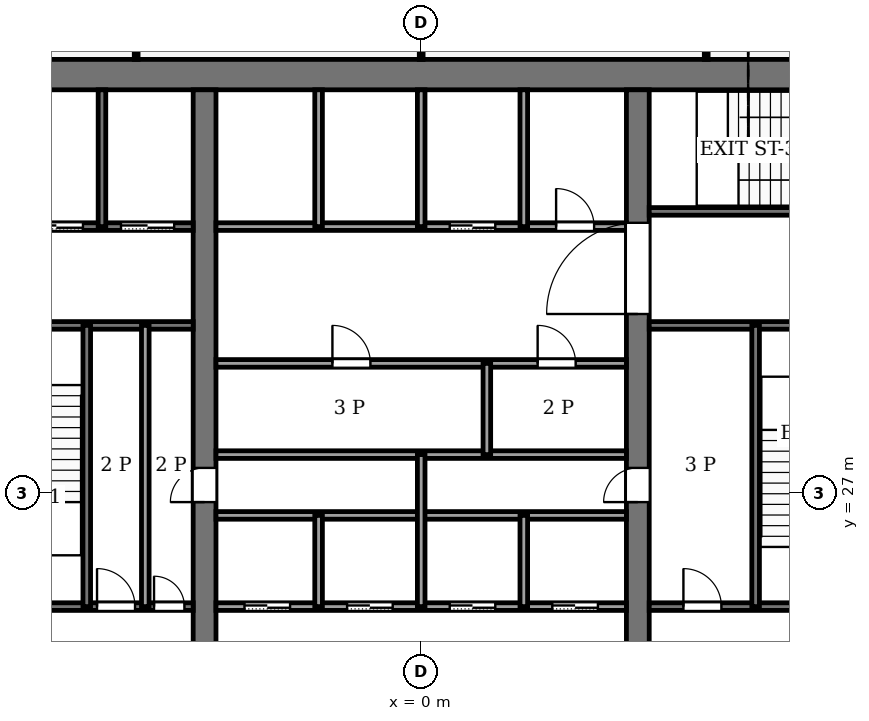
"""IFC4 building model, lengths in metres.
Left out: names, types, materials, properties, quantities, classifications, styles, units other than length and angle.
Written with IfcOpenShell. Run it as: python <this file> out.ifc"""

import sys

from ifc_helpers import new_model, si_unit, direction, frame, frame_2d, origin, place, context, subcontext, project, spatial, rectangle, extrude, element, fill, save


model = new_model("IFC4")
c1 = context("Model", 3, precision=1e-05, world=origin(), true_north=direction((0.0, 1.0)))
c2 = subcontext(c1, "Body", "Model", "MODEL_VIEW")
j1 = project(units=[si_unit("LENGTHUNIT", "METRE"), si_unit("PLANEANGLEUNIT", "RADIAN")], contexts=[c1])
p1 = place(None, origin())
s1 = spatial("IfcSite", under=j1, at=p1, CompositionType="ELEMENT")
p2 = place(p1, origin())
s2 = spatial("IfcBuilding", under=s1, at=p2, CompositionType="ELEMENT")
p3 = place(p2, frame((0.0, 0.0, 258.0)))
s3 = spatial("IfcBuildingStorey", under=s2, at=p3, CompositionType="ELEMENT", Elevation=258.0)
p4 = place(p3, frame((-13.4, 38.0, -0.13), z_axis=(0.0, 0.0, 1.0), x_axis=(1.0, 0.0, 0.0)))
e1 = element("IfcWall", 1, at=p4, inside=s3, PredefinedType="SHEAR", context=c2, shape_type="SweptSolid", body=[
    extrude(rectangle(XDim=26.8, YDim=0.8, at=frame_2d((13.4, 0.0))), origin(), (0.0, 0.0, 1.0), 4.0),
])
p5 = place(p3, frame((-5.7, 18.4, -0.13), z_axis=(0.0, 0.0, 1.0), x_axis=(0.0, 1.0, 0.0)))
e2 = element("IfcWall", 2, at=p5, inside=s3, PredefinedType="SHEAR", context=c2, shape_type="SweptSolid", body=[
    extrude(rectangle(XDim=19.2, YDim=0.6, at=frame_2d((9.6, 0.0))), origin(), (0.0, 0.0, 1.0), 4.0),
])
p6 = place(p5, frame((8.35, 0.0, 0.13)))
e3 = element("IfcOpeningElement", 3, at=p6, cuts=e2, PredefinedType="OPENING", context=c2, shape_type="SweptSolid", body=[
    extrude(rectangle(XDim=0.9, YDim=2.1, at=frame_2d((0.45, 1.05))), frame((0.0, 0.31, 0.0), z_axis=(0.0, -1.0, 0.0), x_axis=(1.0, 0.0, 0.0)), (0.0, 0.0, 1.0), 0.62),
])
p7 = place(p3, frame((5.7, 18.4, -0.13), z_axis=(0.0, 0.0, 1.0), x_axis=(0.0, 1.0, 0.0)))
e4 = element("IfcWall", 4, at=p7, inside=s3, PredefinedType="SHEAR", context=c2, shape_type="SweptSolid", body=[
    extrude(rectangle(XDim=19.2, YDim=0.6, at=frame_2d((9.6, 0.0))), origin(), (0.0, 0.0, 1.0), 4.0),
])
p8 = place(p7, frame((8.35, 0.0, 0.13)))
e5 = element("IfcOpeningElement", 5, at=p8, cuts=e4, PredefinedType="OPENING", context=c2, shape_type="SweptSolid", body=[
    extrude(rectangle(XDim=0.9, YDim=2.1, at=frame_2d((0.45, 1.05))), frame((0.0, 0.31, 0.0), z_axis=(0.0, -1.0, 0.0), x_axis=(1.0, 0.0, 0.0)), (0.0, 0.0, 1.0), 0.62),
])
p9 = place(p7, frame((13.3, 0.0, 0.13)))
e6 = element("IfcOpeningElement", 6, at=p9, cuts=e4, PredefinedType="OPENING", context=c2, shape_type="SweptSolid", body=[
    extrude(rectangle(XDim=2.4, YDim=2.4, at=frame_2d((1.2, 1.2))), frame((0.0, 0.31, 0.0), z_axis=(0.0, -1.0, 0.0), x_axis=(1.0, 0.0, 0.0)), (0.0, 0.0, 1.0), 0.62),
])
p10 = place(p3, frame((-12.6, 24.0, 0.0), z_axis=(0.0, 0.0, 1.0), x_axis=(1.0, 0.0, 0.0)))
e7 = element("IfcWall", 7, at=p10, inside=s3, PredefinedType="PARTITIONING", context=c2, shape_type="SweptSolid", body=[
    extrude(rectangle(XDim=6.6, YDim=0.2, at=frame_2d((3.3, 0.0))), origin(), (0.0, 0.0, 1.0), 3.87),
])
p11 = place(p10, frame((4.07, 0.0, 0.0)))
e8 = element("IfcOpeningElement", 8, at=p11, cuts=e7, PredefinedType="OPENING", context=c2, shape_type="SweptSolid", body=[
    extrude(rectangle(XDim=1.0, YDim=2.1, at=frame_2d((0.5, 1.05))), frame((0.0, 0.11, 0.0), z_axis=(0.0, -1.0, 0.0), x_axis=(1.0, 0.0, 0.0)), (0.0, 0.0, 1.0), 0.22),
])
p12 = place(p10, frame((5.57, 0.0, 0.0)))
e9 = element("IfcOpeningElement", 9, at=p12, cuts=e7, PredefinedType="OPENING", context=c2, shape_type="SweptSolid", body=[
    extrude(rectangle(XDim=0.8, YDim=2.1, at=frame_2d((0.4, 1.05))), frame((0.0, 0.11, 0.0), z_axis=(0.0, -1.0, 0.0), x_axis=(1.0, 0.0, 0.0)), (0.0, 0.0, 1.0), 0.22),
])
p13 = place(p3, frame((-5.4, 24.0, 0.0), z_axis=(0.0, 0.0, 1.0), x_axis=(1.0, 0.0, 0.0)))
e10 = element("IfcWall", 10, at=p13, inside=s3, PredefinedType="PARTITIONING", context=c2, shape_type="SweptSolid", body=[
    extrude(rectangle(XDim=10.8, YDim=0.2, at=frame_2d((5.4, 0.0))), origin(), (0.0, 0.0, 1.0), 3.87),
])
p14 = place(p13, frame((0.75, 0.0, 0.0)))
e11 = element("IfcOpeningElement", 11, at=p14, cuts=e10, PredefinedType="OPENING", context=c2, shape_type="SweptSolid", body=[
    extrude(rectangle(XDim=1.2, YDim=2.2, at=frame_2d((0.6, 1.1))), frame((0.0, 0.11, 0.0), z_axis=(0.0, -1.0, 0.0), x_axis=(1.0, 0.0, 0.0)), (0.0, 0.0, 1.0), 0.22),
])
p15 = place(p13, frame((3.45, 0.0, 0.0)))
e12 = element("IfcOpeningElement", 12, at=p15, cuts=e10, PredefinedType="OPENING", context=c2, shape_type="SweptSolid", body=[
    extrude(rectangle(XDim=1.2, YDim=2.2, at=frame_2d((0.6, 1.1))), frame((0.0, 0.11, 0.0), z_axis=(0.0, -1.0, 0.0), x_axis=(1.0, 0.0, 0.0)), (0.0, 0.0, 1.0), 0.22),
])
p16 = place(p13, frame((6.15, 0.0, 0.0)))
e13 = element("IfcOpeningElement", 13, at=p16, cuts=e10, PredefinedType="OPENING", context=c2, shape_type="SweptSolid", body=[
    extrude(rectangle(XDim=1.2, YDim=2.2, at=frame_2d((0.6, 1.1))), frame((0.0, 0.11, 0.0), z_axis=(0.0, -1.0, 0.0), x_axis=(1.0, 0.0, 0.0)), (0.0, 0.0, 1.0), 0.22),
])
p17 = place(p13, frame((8.85, 0.0, 0.0)))
e14 = element("IfcOpeningElement", 14, at=p17, cuts=e10, PredefinedType="OPENING", context=c2, shape_type="SweptSolid", body=[
    extrude(rectangle(XDim=1.2, YDim=2.2, at=frame_2d((0.6, 1.1))), frame((0.0, 0.11, 0.0), z_axis=(0.0, -1.0, 0.0), x_axis=(1.0, 0.0, 0.0)), (0.0, 0.0, 1.0), 0.22),
])
p18 = place(p3, frame((6.0, 24.0, 0.0), z_axis=(0.0, 0.0, 1.0), x_axis=(1.0, 0.0, 0.0)))
e15 = element("IfcWall", 15, at=p18, inside=s3, PredefinedType="PARTITIONING", context=c2, shape_type="SweptSolid", body=[
    extrude(rectangle(XDim=6.6, YDim=0.2, at=frame_2d((3.3, 0.0))), origin(), (0.0, 0.0, 1.0), 3.87),
])
p19 = place(p18, frame((0.9, 0.0, 0.0)))
e16 = element("IfcOpeningElement", 16, at=p19, cuts=e15, PredefinedType="OPENING", context=c2, shape_type="SweptSolid", body=[
    extrude(rectangle(XDim=1.0, YDim=2.1, at=frame_2d((0.5, 1.05))), frame((0.0, 0.11, 0.0), z_axis=(0.0, -1.0, 0.0), x_axis=(1.0, 0.0, 0.0)), (0.0, 0.0, 1.0), 0.22),
])
p20 = place(p18, frame((4.4, 0.0, 0.0)))
e17 = element("IfcOpeningElement", 17, at=p20, cuts=e15, PredefinedType="OPENING", context=c2, shape_type="SweptSolid", body=[
    extrude(rectangle(XDim=1.2, YDim=2.2, at=frame_2d((0.6, 1.1))), frame((0.0, 0.11, 0.0), z_axis=(0.0, -1.0, 0.0), x_axis=(1.0, 0.0, 0.0)), (0.0, 0.0, 1.0), 0.22),
])
for number, where, z_axis, x_axis in (
    (18, (-5.4, 26.4, 0.0), (0.0, 0.0, 1.0), (1.0, 0.0, 0.0)),
    (19, (-5.4, 28.0, 0.0), (0.0, 0.0, 1.0), (1.0, 0.0, 0.0)),
):
    element("IfcWall", number, at=place(p3, frame(where, z_axis=z_axis, x_axis=x_axis)), inside=s3, PredefinedType="PARTITIONING", context=c2, shape_type="SweptSolid", body=[
        extrude(rectangle(XDim=10.8, YDim=0.2, at=frame_2d((5.4, 0.0))), origin(), (0.0, 0.0, 1.0), 3.87),
    ])
p21 = place(p3, frame((-5.4, 30.4, 0.0), z_axis=(0.0, 0.0, 1.0), x_axis=(1.0, 0.0, 0.0)))
e20 = element("IfcWall", 20, at=p21, inside=s3, PredefinedType="PARTITIONING", context=c2, shape_type="SweptSolid", body=[
    extrude(rectangle(XDim=10.8, YDim=0.2, at=frame_2d((5.4, 0.0))), origin(), (0.0, 0.0, 1.0), 3.87),
])
p22 = place(p21, frame((3.064, 0.0, 0.0)))
e21 = element("IfcOpeningElement", 21, at=p22, cuts=e20, PredefinedType="OPENING", context=c2, shape_type="SweptSolid", body=[
    extrude(rectangle(XDim=1.0, YDim=2.1, at=frame_2d((0.5, 1.05))), frame((0.0, 0.11, 0.0), z_axis=(0.0, -1.0, 0.0), x_axis=(1.0, 0.0, 0.0)), (0.0, 0.0, 1.0), 0.22),
])
p23 = place(p21, frame((8.464, 0.0, 0.0)))
e22 = element("IfcOpeningElement", 22, at=p23, cuts=e20, PredefinedType="OPENING", context=c2, shape_type="SweptSolid", body=[
    extrude(rectangle(XDim=1.0, YDim=2.1, at=frame_2d((0.5, 1.05))), frame((0.0, 0.11, 0.0), z_axis=(0.0, -1.0, 0.0), x_axis=(1.0, 0.0, 0.0)), (0.0, 0.0, 1.0), 0.22),
])
p24 = place(p3, frame((-12.6, 31.4, 0.0), z_axis=(0.0, 0.0, 1.0), x_axis=(1.0, 0.0, 0.0)))
e23 = element("IfcWall", 23, at=p24, inside=s3, PredefinedType="PARTITIONING", context=c2, shape_type="SweptSolid", body=[
    extrude(rectangle(XDim=6.6, YDim=0.2, at=frame_2d((3.3, 0.0))), origin(), (0.0, 0.0, 1.0), 3.87),
])
p25 = place(p24, frame((1.0, 0.0, 0.0)))
e24 = element("IfcOpeningElement", 24, at=p25, cuts=e23, PredefinedType="OPENING", context=c2, shape_type="SweptSolid", body=[
    extrude(rectangle(XDim=1.2, YDim=2.2, at=frame_2d((0.6, 1.1))), frame((0.0, 0.11, 0.0), z_axis=(0.0, -1.0, 0.0), x_axis=(1.0, 0.0, 0.0)), (0.0, 0.0, 1.0), 0.22),
])
p26 = place(p3, frame((6.0, 31.4, 0.0), z_axis=(0.0, 0.0, 1.0), x_axis=(1.0, 0.0, 0.0)))
e25 = element("IfcWall", 25, at=p26, inside=s3, PredefinedType="PARTITIONING", context=c2, shape_type="SweptSolid", body=[
    extrude(rectangle(XDim=6.6, YDim=0.2, at=frame_2d((3.3, 0.0))), origin(), (0.0, 0.0, 1.0), 3.87),
])
p27 = place(p3, frame((-12.6, 34.0, 0.0), z_axis=(0.0, 0.0, 1.0), x_axis=(1.0, 0.0, 0.0)))
e26 = element("IfcWall", 26, at=p27, inside=s3, PredefinedType="PARTITIONING", context=c2, shape_type="SweptSolid", body=[
    extrude(rectangle(XDim=6.6, YDim=0.2, at=frame_2d((3.3, 0.0))), origin(), (0.0, 0.0, 1.0), 3.87),
])
p28 = place(p27, frame((4.7, 0.0, 0.0)))
e27 = element("IfcOpeningElement", 27, at=p28, cuts=e26, PredefinedType="OPENING", context=c2, shape_type="SweptSolid", body=[
    extrude(rectangle(XDim=1.4, YDim=2.2, at=frame_2d((0.7, 1.1))), frame((0.0, 0.11, 0.0), z_axis=(0.0, -1.0, 0.0), x_axis=(1.0, 0.0, 0.0)), (0.0, 0.0, 1.0), 0.22),
])
p29 = place(p27, frame((2.3, 0.0, 0.0)))
e28 = element("IfcOpeningElement", 28, at=p29, cuts=e26, PredefinedType="OPENING", context=c2, shape_type="SweptSolid", body=[
    extrude(rectangle(XDim=1.4, YDim=2.2, at=frame_2d((0.7, 1.1))), frame((0.0, 0.11, 0.0), z_axis=(0.0, -1.0, 0.0), x_axis=(1.0, 0.0, 0.0)), (0.0, 0.0, 1.0), 0.22),
])
p30 = place(p27, frame((0.45, 0.0, 0.0)))
e29 = element("IfcOpeningElement", 29, at=p30, cuts=e26, PredefinedType="OPENING", context=c2, shape_type="SweptSolid", body=[
    extrude(rectangle(XDim=0.9, YDim=2.1, at=frame_2d((0.45, 1.05))), frame((0.0, 0.11, 0.0), z_axis=(0.0, -1.0, 0.0), x_axis=(1.0, 0.0, 0.0)), (0.0, 0.0, 1.0), 0.22),
])
p31 = place(p3, frame((-5.4, 34.0, 0.0), z_axis=(0.0, 0.0, 1.0), x_axis=(1.0, 0.0, 0.0)))
e30 = element("IfcWall", 30, at=p31, inside=s3, PredefinedType="PARTITIONING", context=c2, shape_type="SweptSolid", body=[
    extrude(rectangle(XDim=10.8, YDim=0.2, at=frame_2d((5.4, 0.0))), origin(), (0.0, 0.0, 1.0), 3.87),
])
p32 = place(p31, frame((6.15, 0.0, 0.0)))
e31 = element("IfcOpeningElement", 31, at=p32, cuts=e30, PredefinedType="OPENING", context=c2, shape_type="SweptSolid", body=[
    extrude(rectangle(XDim=1.2, YDim=2.2, at=frame_2d((0.6, 1.1))), frame((0.0, 0.11, 0.0), z_axis=(0.0, -1.0, 0.0), x_axis=(1.0, 0.0, 0.0)), (0.0, 0.0, 1.0), 0.22),
])
p33 = place(p31, frame((8.95, 0.0, 0.0)))
e32 = element("IfcOpeningElement", 32, at=p33, cuts=e30, PredefinedType="OPENING", context=c2, shape_type="SweptSolid", body=[
    extrude(rectangle(XDim=1.0, YDim=2.1, at=frame_2d((0.5, 1.05))), frame((0.0, 0.11, 0.0), z_axis=(0.0, -1.0, 0.0), x_axis=(1.0, 0.0, 0.0)), (0.0, 0.0, 1.0), 0.22),
])
p34 = place(p3, frame((6.0, 34.4, 0.0), z_axis=(0.0, 0.0, 1.0), x_axis=(1.0, 0.0, 0.0)))
e33 = element("IfcWall", 33, at=p34, inside=s3, PredefinedType="PARTITIONING", context=c2, shape_type="SweptSolid", body=[
    extrude(rectangle(XDim=6.6, YDim=0.2, at=frame_2d((3.3, 0.0))), origin(), (0.0, 0.0, 1.0), 3.87),
])
p35 = place(p34, frame((4.8, 0.0, 0.0)))
e34 = element("IfcOpeningElement", 34, at=p35, cuts=e33, PredefinedType="OPENING", context=c2, shape_type="SweptSolid", body=[
    extrude(rectangle(XDim=1.2, YDim=2.2, at=frame_2d((0.6, 1.1))), frame((0.0, 0.11, 0.0), z_axis=(0.0, -1.0, 0.0), x_axis=(1.0, 0.0, 0.0)), (0.0, 0.0, 1.0), 0.22),
])
p36 = place(p3, frame((-8.8, 24.0, 0.0), z_axis=(0.0, 0.0, 1.0), x_axis=(0.0, 1.0, 0.0)))
e35 = element("IfcWall", 35, at=p36, inside=s3, PredefinedType="PARTITIONING", context=c2, shape_type="SweptSolid", body=[
    extrude(rectangle(XDim=7.4, YDim=0.2, at=frame_2d((3.7, 0.0))), origin(), (0.0, 0.0, 1.0), 3.87),
])
p37 = place(p3, frame((-8.4, 34.0, 0.0), z_axis=(0.0, 0.0, 1.0), x_axis=(0.0, 1.0, 0.0)))
e36 = element("IfcWall", 36, at=p37, inside=s3, PredefinedType="PARTITIONING", context=c2, shape_type="SweptSolid", body=[
    extrude(rectangle(XDim=3.6, YDim=0.2, at=frame_2d((1.8, 0.0))), origin(), (0.0, 0.0, 1.0), 3.87),
])
p38 = place(p3, frame((-7.26, 24.0, 0.0), z_axis=(0.0, 0.0, 1.0), x_axis=(0.0, 1.0, 0.0)))
e37 = element("IfcWall", 37, at=p38, inside=s3, PredefinedType="PARTITIONING", context=c2, shape_type="SweptSolid", body=[
    extrude(rectangle(XDim=7.4, YDim=0.2, at=frame_2d((3.7, 0.0))), origin(), (0.0, 0.0, 1.0), 3.87),
])
p39 = place(p3, frame((-2.7, 24.0, 0.0), z_axis=(0.0, 0.0, 1.0), x_axis=(0.0, 1.0, 0.0)))
e38 = element("IfcWall", 38, at=p39, inside=s3, PredefinedType="PARTITIONING", context=c2, shape_type="SweptSolid", body=[
    extrude(rectangle(XDim=2.4, YDim=0.2, at=frame_2d((1.2, 0.0))), origin(), (0.0, 0.0, 1.0), 3.87),
])
p40 = place(p3, frame((-2.7, 34.0, 0.0), z_axis=(0.0, 0.0, 1.0), x_axis=(0.0, 1.0, 0.0)))
e39 = element("IfcWall", 39, at=p40, inside=s3, PredefinedType="PARTITIONING", context=c2, shape_type="SweptSolid", body=[
    extrude(rectangle(XDim=3.6, YDim=0.2, at=frame_2d((1.8, 0.0))), origin(), (0.0, 0.0, 1.0), 3.87),
])
p41 = place(p3, frame((0.0, 24.0, 0.0), z_axis=(0.0, 0.0, 1.0), x_axis=(0.0, 1.0, 0.0)))
e40 = element("IfcWall", 40, at=p41, inside=s3, PredefinedType="PARTITIONING", context=c2, shape_type="SweptSolid", body=[
    extrude(rectangle(XDim=4.0, YDim=0.2, at=frame_2d((2.0, 0.0))), origin(), (0.0, 0.0, 1.0), 3.87),
])
p42 = place(p3, frame((0.0, 34.0, 0.0), z_axis=(0.0, 0.0, 1.0), x_axis=(0.0, 1.0, 0.0)))
e41 = element("IfcWall", 41, at=p42, inside=s3, PredefinedType="PARTITIONING", context=c2, shape_type="SweptSolid", body=[
    extrude(rectangle(XDim=3.6, YDim=0.2, at=frame_2d((1.8, 0.0))), origin(), (0.0, 0.0, 1.0), 3.87),
])
for number, where, z_axis, x_axis in (
    (42, (1.728, 28.0, 0.0), (0.0, 0.0, 1.0), (0.0, 1.0, 0.0)),
    (43, (2.7, 24.0, 0.0), (0.0, 0.0, 1.0), (0.0, 1.0, 0.0)),
):
    element("IfcWall", number, at=place(p3, frame(where, z_axis=z_axis, x_axis=x_axis)), inside=s3, PredefinedType="PARTITIONING", context=c2, shape_type="SweptSolid", body=[
        extrude(rectangle(XDim=2.4, YDim=0.2, at=frame_2d((1.2, 0.0))), origin(), (0.0, 0.0, 1.0), 3.87),
    ])
p43 = place(p3, frame((2.7, 34.0, 0.0), z_axis=(0.0, 0.0, 1.0), x_axis=(0.0, 1.0, 0.0)))
e44 = element("IfcWall", 44, at=p43, inside=s3, PredefinedType="PARTITIONING", context=c2, shape_type="SweptSolid", body=[
    extrude(rectangle(XDim=3.6, YDim=0.2, at=frame_2d((1.8, 0.0))), origin(), (0.0, 0.0, 1.0), 3.87),
])
p44 = place(p3, frame((8.8, 24.0, 0.0), z_axis=(0.0, 0.0, 1.0), x_axis=(0.0, 1.0, 0.0)))
e45 = element("IfcWall", 45, at=p44, inside=s3, PredefinedType="PARTITIONING", context=c2, shape_type="SweptSolid", body=[
    extrude(rectangle(XDim=7.4, YDim=0.2, at=frame_2d((3.7, 0.0))), origin(), (0.0, 0.0, 1.0), 3.87),
])
p45 = place(p3, frame((-7.5, 40.504, 0.0), z_axis=(0.0, 0.0, 1.0), x_axis=(0.0, -1.0, 0.0)))
e46 = element("IfcWall", 46, at=p45, inside=s3, PredefinedType="PARTITIONING", context=c2, shape_type="SweptSolid", body=[
    extrude(rectangle(XDim=2.104, YDim=0.1, at=frame_2d((1.052, 0.0))), origin(), (0.0, 0.0, 1.0), 3.87),
])
p46 = place(p45, frame((0.552, 0.0, 0.0)))
e47 = element("IfcOpeningElement", 47, at=p46, cuts=e46, PredefinedType="OPENING", context=c2, shape_type="SweptSolid", body=[
    extrude(rectangle(XDim=1.0, YDim=2.1, at=frame_2d((0.5, 1.05))), frame((0.0, 0.06, 0.0), z_axis=(0.0, -1.0, 0.0), x_axis=(1.0, 0.0, 0.0)), (0.0, 0.0, 1.0), 0.12),
])
p47 = place(p3, frame((0.0, 38.4, 0.0), z_axis=(0.0, 0.0, 1.0), x_axis=(0.0, 1.0, 0.0)))
e48 = element("IfcWall", 48, at=p47, inside=s3, PredefinedType="PARTITIONING", context=c2, shape_type="SweptSolid", body=[
    extrude(rectangle(XDim=8.104, YDim=0.1, at=frame_2d((4.052, 0.0))), origin(), (0.0, 0.0, 1.0), 3.44),
])
p48 = place(p3, frame((7.5, 43.504, 0.0), z_axis=(0.0, 0.0, 1.0), x_axis=(0.0, -1.0, 0.0)))
e49 = element("IfcWall", 49, at=p48, inside=s3, PredefinedType="PARTITIONING", context=c2, shape_type="SweptSolid", body=[
    extrude(rectangle(XDim=5.104, YDim=0.1, at=frame_2d((2.552, 0.0))), origin(), (0.0, 0.0, 1.0), 3.87),
])
p49 = place(p14, origin())
e50 = element("IfcDoor", 50, at=p49, inside=s3, OperationType="SLIDING_TO_LEFT", PredefinedType="DOOR", context=c2, shape_type="SweptSolid", body=[
    extrude(rectangle(XDim=1.2, YDim=2.2, at=frame_2d((0.6, 1.1))), frame((0.0, 0.025, 0.0), z_axis=(0.0, -1.0, 0.0), x_axis=(1.0, 0.0, 0.0)), (0.0, 0.0, 1.0), 0.05),
])
fill(e11, e50)
p50 = place(p15, origin())
e51 = element("IfcDoor", 51, at=p50, inside=s3, OperationType="SLIDING_TO_LEFT", PredefinedType="DOOR", context=c2, shape_type="SweptSolid", body=[
    extrude(rectangle(XDim=1.2, YDim=2.2, at=frame_2d((0.6, 1.1))), frame((0.0, 0.025, 0.0), z_axis=(0.0, -1.0, 0.0), x_axis=(1.0, 0.0, 0.0)), (0.0, 0.0, 1.0), 0.05),
])
fill(e12, e51)
p51 = place(p16, origin())
e52 = element("IfcDoor", 52, at=p51, inside=s3, OperationType="SLIDING_TO_LEFT", PredefinedType="DOOR", context=c2, shape_type="SweptSolid", body=[
    extrude(rectangle(XDim=1.2, YDim=2.2, at=frame_2d((0.6, 1.1))), frame((0.0, 0.025, 0.0), z_axis=(0.0, -1.0, 0.0), x_axis=(1.0, 0.0, 0.0)), (0.0, 0.0, 1.0), 0.05),
])
fill(e13, e52)
p52 = place(p17, origin())
e53 = element("IfcDoor", 53, at=p52, inside=s3, OperationType="SLIDING_TO_LEFT", PredefinedType="DOOR", context=c2, shape_type="SweptSolid", body=[
    extrude(rectangle(XDim=1.2, YDim=2.2, at=frame_2d((0.6, 1.1))), frame((0.0, 0.025, 0.0), z_axis=(0.0, -1.0, 0.0), x_axis=(1.0, 0.0, 0.0)), (0.0, 0.0, 1.0), 0.05),
])
fill(e14, e53)
p53 = place(p32, origin())
e54 = element("IfcDoor", 54, at=p53, inside=s3, OperationType="SLIDING_TO_LEFT", PredefinedType="DOOR", context=c2, shape_type="SweptSolid", body=[
    extrude(rectangle(XDim=1.2, YDim=2.2, at=frame_2d((0.6, 1.1))), frame((0.0, 0.025, 0.0), z_axis=(0.0, -1.0, 0.0), x_axis=(1.0, 0.0, 0.0)), (0.0, 0.0, 1.0), 0.05),
])
fill(e31, e54)
p54 = place(p28, origin())
e55 = element("IfcDoor", 55, at=p54, inside=s3, OperationType="SLIDING_TO_LEFT", PredefinedType="DOOR", context=c2, shape_type="SweptSolid", body=[
    extrude(rectangle(XDim=1.4, YDim=2.2, at=frame_2d((0.7, 1.1))), frame((0.0, 0.025, 0.0), z_axis=(0.0, -1.0, 0.0), x_axis=(1.0, 0.0, 0.0)), (0.0, 0.0, 1.0), 0.05),
])
fill(e27, e55)
p55 = place(p29, origin())
e56 = element("IfcDoor", 56, at=p55, inside=s3, OperationType="SLIDING_TO_LEFT", PredefinedType="DOOR", context=c2, shape_type="SweptSolid", body=[
    extrude(rectangle(XDim=1.4, YDim=2.2, at=frame_2d((0.7, 1.1))), frame((0.0, 0.025, 0.0), z_axis=(0.0, -1.0, 0.0), x_axis=(1.0, 0.0, 0.0)), (0.0, 0.0, 1.0), 0.05),
])
fill(e28, e56)
p56 = place(p22, origin())
e57 = element("IfcDoor", 57, at=p56, inside=s3, OperationType="SINGLE_SWING_RIGHT", PredefinedType="DOOR", context=c2, shape_type="SweptSolid", body=[
    extrude(rectangle(XDim=1.0, YDim=2.1, at=frame_2d((0.5, 1.05))), frame((0.0, 0.025, 0.0), z_axis=(0.0, -1.0, 0.0), x_axis=(1.0, 0.0, 0.0)), (0.0, 0.0, 1.0), 0.05),
])
fill(e21, e57)
p57 = place(p23, origin())
e58 = element("IfcDoor", 58, at=p57, inside=s3, OperationType="SINGLE_SWING_LEFT", PredefinedType="DOOR", context=c2, shape_type="SweptSolid", body=[
    extrude(rectangle(XDim=1.0, YDim=2.1, at=frame_2d((0.5, 1.05))), frame((0.0, 0.025, 0.0), z_axis=(0.0, -1.0, 0.0), x_axis=(1.0, 0.0, 0.0)), (0.0, 0.0, 1.0), 0.05),
])
fill(e22, e58)
p58 = place(p11, origin())
e59 = element("IfcDoor", 59, at=p58, inside=s3, OperationType="SINGLE_SWING_RIGHT", PredefinedType="DOOR", context=c2, shape_type="SweptSolid", body=[
    extrude(rectangle(XDim=1.0, YDim=2.1, at=frame_2d((0.5, 1.05))), frame((0.0, 0.025, 0.0), z_axis=(0.0, -1.0, 0.0), x_axis=(1.0, 0.0, 0.0)), (0.0, 0.0, 1.0), 0.05),
])
fill(e8, e59)
p59 = place(p12, origin())
e60 = element("IfcDoor", 60, at=p59, inside=s3, OperationType="SINGLE_SWING_LEFT", PredefinedType="DOOR", context=c2, shape_type="SweptSolid", body=[
    extrude(rectangle(XDim=0.8, YDim=2.1, at=frame_2d((0.4, 1.05))), frame((0.0, 0.025, 0.0), z_axis=(0.0, -1.0, 0.0), x_axis=(1.0, 0.0, 0.0)), (0.0, 0.0, 1.0), 0.05),
])
fill(e9, e60)
p60 = place(p19, origin())
e61 = element("IfcDoor", 61, at=p60, inside=s3, OperationType="SINGLE_SWING_RIGHT", PredefinedType="DOOR", context=c2, shape_type="SweptSolid", body=[
    extrude(rectangle(XDim=1.0, YDim=2.1, at=frame_2d((0.5, 1.05))), frame((0.0, 0.025, 0.0), z_axis=(0.0, -1.0, 0.0), x_axis=(1.0, 0.0, 0.0)), (0.0, 0.0, 1.0), 0.05),
])
fill(e16, e61)
p61 = place(p33, origin())
e62 = element("IfcDoor", 62, at=p61, inside=s3, OperationType="SINGLE_SWING_LEFT", PredefinedType="DOOR", context=c2, shape_type="SweptSolid", body=[
    extrude(rectangle(XDim=1.0, YDim=2.1, at=frame_2d((0.5, 1.05))), frame((0.0, 0.025, 0.0), z_axis=(0.0, -1.0, 0.0), x_axis=(1.0, 0.0, 0.0)), (0.0, 0.0, 1.0), 0.05),
])
fill(e32, e62)
p62 = place(p6, origin())
e63 = element("IfcDoor", 63, at=p62, inside=s3, OperationType="SINGLE_SWING_LEFT", PredefinedType="DOOR", context=c2, shape_type="SweptSolid", body=[
    extrude(rectangle(XDim=0.9, YDim=2.1, at=frame_2d((0.45, 1.05))), frame((0.0, 0.025, 0.0), z_axis=(0.0, -1.0, 0.0), x_axis=(1.0, 0.0, 0.0)), (0.0, 0.0, 1.0), 0.05),
])
fill(e3, e63)
p63 = place(p8, origin())
e64 = element("IfcDoor", 64, at=p63, inside=s3, OperationType="SINGLE_SWING_RIGHT", PredefinedType="DOOR", context=c2, shape_type="SweptSolid", body=[
    extrude(rectangle(XDim=0.9, YDim=2.1, at=frame_2d((0.45, 1.05))), frame((0.0, 0.025, 0.0), z_axis=(0.0, -1.0, 0.0), x_axis=(1.0, 0.0, 0.0)), (0.0, 0.0, 1.0), 0.05),
])
fill(e5, e64)
p64 = place(p9, origin())
e65 = element("IfcDoor", 65, at=p64, inside=s3, OperationType="DOUBLE_DOOR_SINGLE_SWING", PredefinedType="DOOR", context=c2, shape_type="SweptSolid", body=[
    extrude(rectangle(XDim=2.4, YDim=2.4, at=frame_2d((1.2, 1.2))), frame((0.0, 0.025, 0.0), z_axis=(0.0, -1.0, 0.0), x_axis=(1.0, 0.0, 0.0)), (0.0, 0.0, 1.0), 0.05),
])
fill(e6, e65)
save(model, sys.argv[1])
